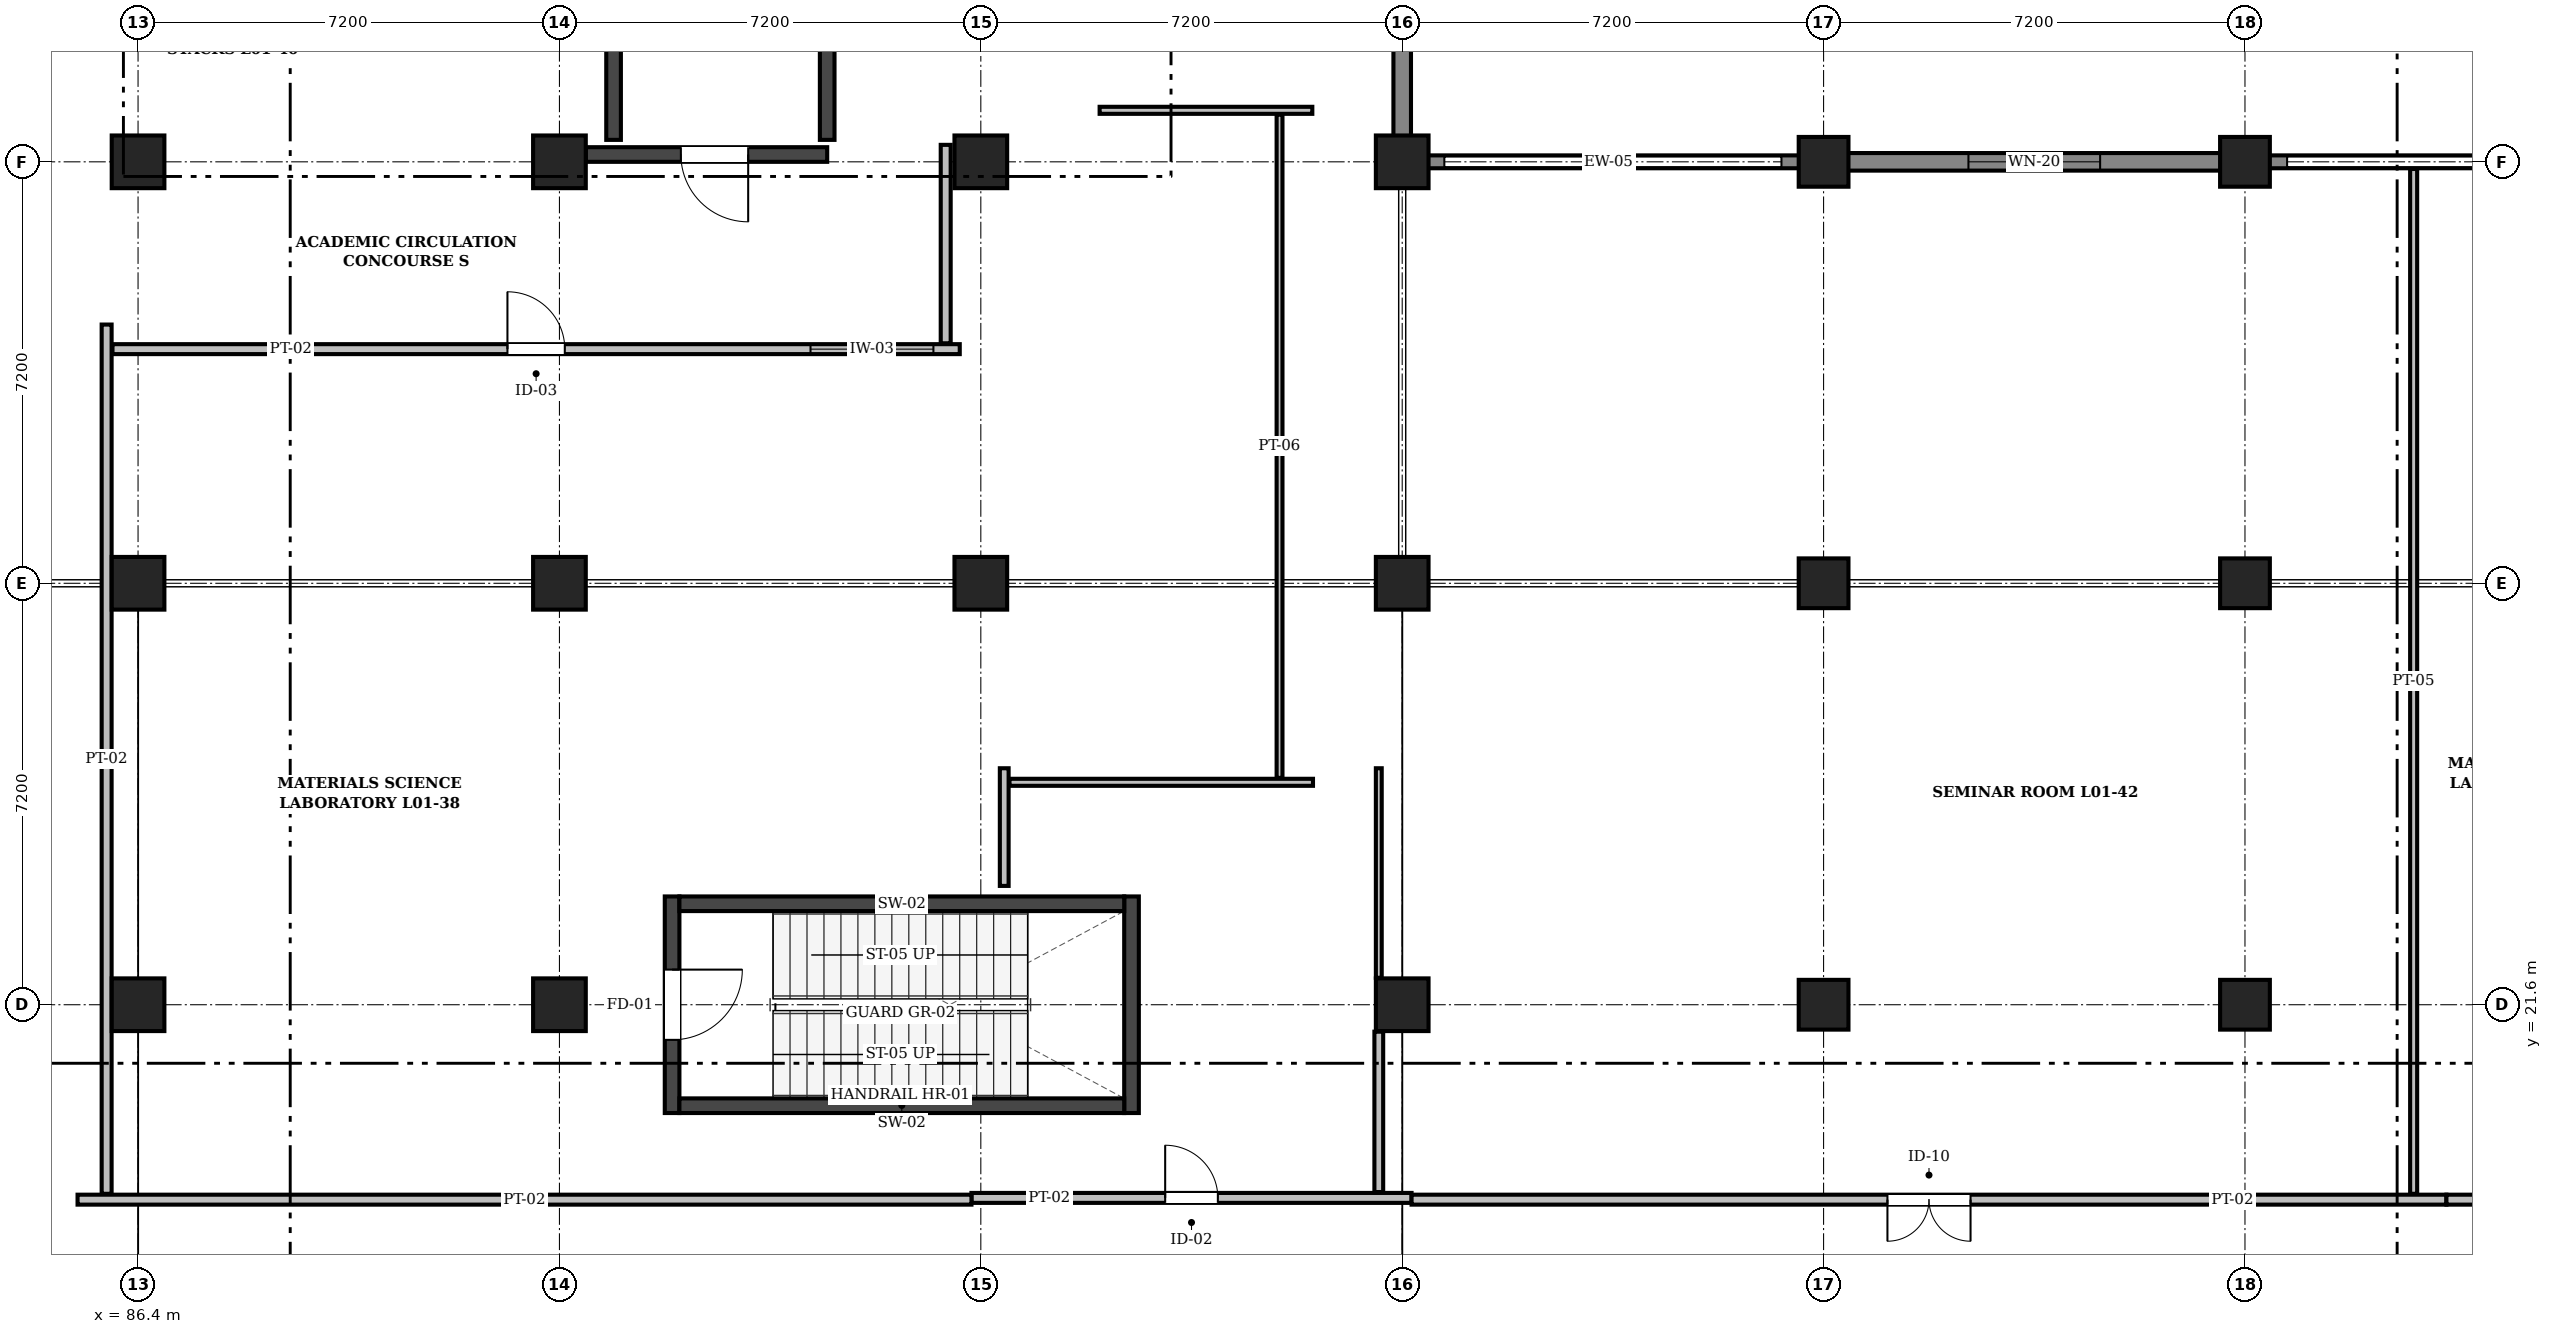
"""IFC4 building model, lengths in metres.
Left out: names, types, materials, properties, quantities, classifications, styles, units other than length and angle.
Written with IfcOpenShell. Run it as: python <this file> out.ifc"""

import sys

from ifc_helpers import new_model, si_unit, direction, frame, frame_2d, origin, origin_2d, place, context, subcontext, project, spatial, rectangle, extrude, element, fill, save


model = new_model("IFC4")
c1 = context("Model", 3, precision=1e-05, world=origin(), true_north=direction((0.0, 1.0)))
c2 = subcontext(c1, "Body", "Model", "MODEL_VIEW")
j1 = project(units=[si_unit("LENGTHUNIT", "METRE"), si_unit("PLANEANGLEUNIT", "RADIAN")], contexts=[c1])
p1 = place(None, origin())
s1 = spatial("IfcSite", under=j1, at=p1, CompositionType="ELEMENT")
p2 = place(p1, origin())
s2 = spatial("IfcBuilding", under=s1, at=p2, CompositionType="ELEMENT")
p3 = place(p2, frame((0.0, 0.0, 4.8)))
s3 = spatial("IfcBuildingStorey", under=s2, at=p3, CompositionType="ELEMENT", Elevation=4.8)
for number, where, z_axis, x_axis in (
    (1, (86.4, 21.6, 0.0), (0.0, 0.0, 1.0), (1.0, 0.0, 0.0)),
    (2, (86.4, 28.8, 0.0), (0.0, 0.0, 1.0), (1.0, 0.0, 0.0)),
    (3, (86.4, 36.0, 0.0), (0.0, 0.0, 1.0), (1.0, 0.0, 0.0)),
    (4, (93.6, 21.6, 0.0), (0.0, 0.0, 1.0), (1.0, 0.0, 0.0)),
    (5, (93.6, 28.8, 0.0), (0.0, 0.0, 1.0), (1.0, 0.0, 0.0)),
    (6, (93.6, 36.0, 0.0), (0.0, 0.0, 1.0), (1.0, 0.0, 0.0)),
    (7, (100.8, 28.8, 0.0), (0.0, 0.0, 1.0), (1.0, 0.0, 0.0)),
    (8, (100.8, 36.0, 0.0), (0.0, 0.0, 1.0), (1.0, 0.0, 0.0)),
    (9, (108.0, 21.6, 0.0), (0.0, 0.0, 1.0), (1.0, 0.0, 0.0)),
    (10, (108.0, 28.8, 0.0), (0.0, 0.0, 1.0), (1.0, 0.0, 0.0)),
    (11, (108.0, 36.0, 0.0), (0.0, 0.0, 1.0), (1.0, 0.0, 0.0)),
):
    element("IfcColumn", number, at=place(p3, frame(where, z_axis=z_axis, x_axis=x_axis)), inside=s3, PredefinedType="COLUMN", context=c2, shape_type="SweptSolid", body=[
        extrude(rectangle(XDim=0.9, YDim=0.9, at=origin_2d()), origin(), (0.0, 0.0, 1.0), 4.8),
    ])
for number, where, z_axis, x_axis in (
    (12, (115.2, 21.6, 0.0), (0.0, 0.0, 1.0), (1.0, 0.0, 0.0)),
    (13, (115.2, 28.8, 0.0), (0.0, 0.0, 1.0), (1.0, 0.0, 0.0)),
    (14, (115.2, 36.0, 0.0), (0.0, 0.0, 1.0), (1.0, 0.0, 0.0)),
    (15, (122.4, 21.6, 0.0), (0.0, 0.0, 1.0), (1.0, 0.0, 0.0)),
    (16, (122.4, 28.8, 0.0), (0.0, 0.0, 1.0), (1.0, 0.0, 0.0)),
    (17, (122.4, 36.0, 0.0), (0.0, 0.0, 1.0), (1.0, 0.0, 0.0)),
):
    element("IfcColumn", number, at=place(p3, frame(where, z_axis=z_axis, x_axis=x_axis)), inside=s3, PredefinedType="COLUMN", context=c2, shape_type="SweptSolid", body=[
        extrude(rectangle(XDim=0.85, YDim=0.85, at=origin_2d()), origin(), (0.0, 0.0, 1.0), 4.8),
    ])
p4 = place(p3, frame((108.0, 43.2, 0.0), z_axis=(0.0, 0.0, 1.0), x_axis=(0.0, -1.0, 0.0)))
e18 = element("IfcWall", 18, at=p4, inside=s3, PredefinedType="SOLIDWALL", context=c2, shape_type="SweptSolid", body=[
    extrude(rectangle(XDim=7.048, YDim=0.3, at=frame_2d((3.524, 0.0))), origin(), (0.0, 0.0, 1.0), 4.52),
])
p5 = place(p4, frame((2.145, 0.0, 0.95)))
e19 = element("IfcOpeningElement", 19, at=p5, cuts=e18, PredefinedType="OPENING", context=c2, shape_type="SweptSolid", body=[
    extrude(rectangle(XDim=2.05, YDim=1.55, at=frame_2d((1.025, 0.775))), frame((0.0, 0.162, 0.0), z_axis=(0.0, -1.0, 0.0), x_axis=(1.0, 0.0, 0.0)), (0.0, 0.0, 1.0), 0.324),
])
p6 = place(p3, frame((107.85, 36.0, 0.0), z_axis=(0.0, 0.0, 1.0), x_axis=(1.0, 0.0, 0.0)))
e20 = element("IfcWall", 20, at=p6, inside=s3, PredefinedType="SOLIDWALL", context=c2, shape_type="SweptSolid", body=[
    extrude(rectangle(XDim=7.35, YDim=0.22, at=frame_2d((3.675, 0.0))), origin(), (0.0, 0.0, 1.0), 1.24),
])
p7 = place(p3, frame((115.2, 36.0, 0.0), z_axis=(0.0, 0.0, 1.0), x_axis=(1.0, 0.0, 0.0)))
e21 = element("IfcWall", 21, at=p7, inside=s3, PredefinedType="SOLIDWALL", context=c2, shape_type="SweptSolid", body=[
    extrude(rectangle(XDim=7.2, YDim=0.3, at=frame_2d((3.6, 0.0))), origin(), (0.0, 0.0, 1.0), 4.52),
])
p8 = place(p7, frame((2.475, 0.0, 0.95)))
e22 = element("IfcOpeningElement", 22, at=p8, cuts=e21, PredefinedType="OPENING", context=c2, shape_type="SweptSolid", body=[
    extrude(rectangle(XDim=2.25, YDim=1.55, at=frame_2d((1.125, 0.775))), frame((0.0, 0.162, 0.0), z_axis=(0.0, -1.0, 0.0), x_axis=(1.0, 0.0, 0.0)), (0.0, 0.0, 1.0), 0.324),
])
p9 = place(p3, frame((122.4, 36.0, 0.0), z_axis=(0.0, 0.0, 1.0), x_axis=(1.0, 0.0, 0.0)))
e23 = element("IfcWall", 23, at=p9, inside=s3, PredefinedType="SOLIDWALL", context=c2, shape_type="SweptSolid", body=[
    extrude(rectangle(XDim=7.2, YDim=0.22, at=frame_2d((3.6, 0.0))), origin(), (0.0, 0.0, 1.0), 1.24),
])
p10 = place(p3, frame((95.525, 19.75, 0.0), z_axis=(0.0, 0.0, 1.0), x_axis=(0.0, 1.0, 0.0)))
e24 = element("IfcWall", 24, at=p10, inside=s3, PredefinedType="SHEAR", context=c2, shape_type="SweptSolid", body=[
    extrude(rectangle(XDim=3.7, YDim=0.25, at=frame_2d((1.85, 0.0))), origin(), (0.0, 0.0, 1.0), 4.55),
])
p11 = place(p10, frame((1.25, 0.0, 0.0)))
e25 = element("IfcOpeningElement", 25, at=p11, cuts=e24, PredefinedType="OPENING", context=c2, shape_type="SweptSolid", body=[
    extrude(rectangle(XDim=1.2, YDim=2.15, at=frame_2d((0.6, 1.075))), frame((0.0, 0.137, 0.0), z_axis=(0.0, -1.0, 0.0), x_axis=(1.0, 0.0, 0.0)), (0.0, 0.0, 1.0), 0.274),
])
p12 = place(p3, frame((103.375, 19.75, 0.0), z_axis=(0.0, 0.0, 1.0), x_axis=(0.0, 1.0, 0.0)))
e26 = element("IfcWall", 26, at=p12, inside=s3, PredefinedType="SHEAR", context=c2, shape_type="SweptSolid", body=[
    extrude(rectangle(XDim=3.7, YDim=0.25, at=frame_2d((1.85, 0.0))), origin(), (0.0, 0.0, 1.0), 4.55),
])
for number, where, z_axis, x_axis in (
    (27, (95.65, 19.875, 0.0), (0.0, 0.0, 1.0), (1.0, 0.0, 0.0)),
    (28, (95.65, 23.325, 0.0), (0.0, 0.0, 1.0), (1.0, 0.0, 0.0)),
):
    element("IfcWall", number, at=place(p3, frame(where, z_axis=z_axis, x_axis=x_axis)), inside=s3, PredefinedType="SHEAR", context=c2, shape_type="SweptSolid", body=[
        extrude(rectangle(XDim=7.6, YDim=0.25, at=frame_2d((3.8, 0.0))), origin(), (0.0, 0.0, 1.0), 4.55),
    ])
p13 = place(p3, frame((94.05, 36.125, 0.0), z_axis=(0.0, 0.0, 1.0), x_axis=(1.0, 0.0, 0.0)))
e29 = element("IfcWall", 29, at=p13, inside=s3, PredefinedType="SHEAR", context=c2, shape_type="SweptSolid", body=[
    extrude(rectangle(XDim=4.125, YDim=0.25, at=frame_2d((2.062, 0.0))), origin(), (0.0, 0.0, 1.0), 4.55),
])
p14 = place(p13, frame((1.625, 0.0, 0.0)))
e30 = element("IfcOpeningElement", 30, at=p14, cuts=e29, PredefinedType="OPENING", context=c2, shape_type="SweptSolid", body=[
    extrude(rectangle(XDim=1.15, YDim=2.15, at=frame_2d((0.575, 1.075))), frame((0.0, 0.137, 0.0), z_axis=(0.0, -1.0, 0.0), x_axis=(1.0, 0.0, 0.0)), (0.0, 0.0, 1.0), 0.274),
])
p15 = place(p3, frame((94.525, 36.375, 0.0), z_axis=(0.0, 0.0, 1.0), x_axis=(0.0, 1.0, 0.0)))
e31 = element("IfcWall", 31, at=p15, inside=s3, PredefinedType="SHEAR", context=c2, shape_type="SweptSolid", body=[
    extrude(rectangle(XDim=2.77, YDim=0.25, at=frame_2d((1.385, 0.0))), origin(), (0.0, 0.0, 1.0), 4.55),
])
p16 = place(p3, frame((98.175, 36.375, 0.0), z_axis=(0.0, 0.0, 1.0), x_axis=(0.0, 1.0, 0.0)))
e32 = element("IfcWall", 32, at=p16, inside=s3, PredefinedType="SHEAR", context=c2, shape_type="SweptSolid", body=[
    extrude(rectangle(XDim=3.225, YDim=0.25, at=frame_2d((1.613, 0.0))), origin(), (0.0, 0.0, 1.0), 4.55),
])
p17 = place(p3, frame((100.64, 18.3, 0.0), z_axis=(0.0, 0.0, 1.0), x_axis=(1.0, 0.0, 0.0)))
e33 = element("IfcWall", 33, at=p17, inside=s3, PredefinedType="PARTITIONING", context=c2, shape_type="SweptSolid", body=[
    extrude(rectangle(XDim=7.52, YDim=0.17, at=frame_2d((3.76, 0.0))), origin(), (0.0, 0.0, 1.0), 4.46),
])
p18 = place(p17, frame((3.31, 0.0, 0.0)))
e34 = element("IfcOpeningElement", 34, at=p18, cuts=e33, PredefinedType="OPENING", context=c2, shape_type="SweptSolid", body=[
    extrude(rectangle(XDim=0.9, YDim=2.08, at=frame_2d((0.45, 1.04))), frame((0.0, 0.097, 0.0), z_axis=(0.0, -1.0, 0.0), x_axis=(1.0, 0.0, 0.0)), (0.0, 0.0, 1.0), 0.194),
])
p19 = place(p3, frame((101.2, 23.63, 0.0), z_axis=(0.0, 0.0, 1.0), x_axis=(0.0, 1.0, 0.0)))
e35 = element("IfcWall", 35, at=p19, inside=s3, PredefinedType="PARTITIONING", context=c2, shape_type="SweptSolid", body=[
    extrude(rectangle(XDim=2.01, YDim=0.15, at=frame_2d((1.005, 0.0))), origin(), (0.0, 0.0, 1.0), 4.46),
])
p20 = place(p3, frame((101.29, 25.4, 0.0), z_axis=(0.0, 0.0, 1.0), x_axis=(1.0, 0.0, 0.0)))
e36 = element("IfcWall", 36, at=p20, inside=s3, PredefinedType="PARTITIONING", context=c2, shape_type="SweptSolid", body=[
    extrude(rectangle(XDim=5.186, YDim=0.12, at=frame_2d((2.593, 0.0))), origin(), (0.0, 0.0, 1.0), 4.46),
])
p21 = place(p3, frame((107.6, 22.06, 0.0), z_axis=(0.0, 0.0, 1.0), x_axis=(0.0, 1.0, 0.0)))
e37 = element("IfcWall", 37, at=p21, inside=s3, PredefinedType="PARTITIONING", context=c2, shape_type="SweptSolid", body=[
    extrude(rectangle(XDim=3.58, YDim=0.1, at=frame_2d((1.79, 0.0))), origin(), (0.0, 0.0, 1.0), 4.46),
])
p22 = place(p3, frame((107.6, 18.4, 0.0), z_axis=(0.0, 0.0, 1.0), x_axis=(0.0, 1.0, 0.0)))
e38 = element("IfcWall", 38, at=p22, inside=s3, PredefinedType="PARTITIONING", context=c2, shape_type="SweptSolid", body=[
    extrude(rectangle(XDim=2.74, YDim=0.15, at=frame_2d((1.37, 0.0))), origin(), (0.0, 0.0, 1.0), 4.46),
])
p23 = place(p3, frame((85.366, 18.27, 0.0), z_axis=(0.0, 0.0, 1.0), x_axis=(1.0, 0.0, 0.0)))
e39 = element("IfcWall", 39, at=p23, inside=s3, PredefinedType="PARTITIONING", context=c2, shape_type="SweptSolid", body=[
    extrude(rectangle(XDim=15.273, YDim=0.17, at=frame_2d((7.637, 0.0))), origin(), (0.0, 0.0, 1.0), 4.46),
])
p24 = place(p3, frame((108.16, 18.27, 0.0), z_axis=(0.0, 0.0, 1.0), x_axis=(1.0, 0.0, 0.0)))
e40 = element("IfcWall", 40, at=p24, inside=s3, PredefinedType="PARTITIONING", context=c2, shape_type="SweptSolid", body=[
    extrude(rectangle(XDim=17.682, YDim=0.17, at=frame_2d((8.841, 0.0))), origin(), (0.0, 0.0, 1.0), 4.46),
])
p25 = place(p24, frame((8.131, 0.0, 0.0)))
e41 = element("IfcOpeningElement", 41, at=p25, cuts=e40, PredefinedType="OPENING", context=c2, shape_type="SweptSolid", body=[
    extrude(rectangle(XDim=1.42, YDim=2.24, at=frame_2d((0.71, 1.12))), frame((0.0, 0.097, 0.0), z_axis=(0.0, -1.0, 0.0), x_axis=(1.0, 0.0, 0.0)), (0.0, 0.0, 1.0), 0.194),
])
p26 = place(p3, frame((125.842, 18.27, 0.0), z_axis=(0.0, 0.0, 1.0), x_axis=(1.0, 0.0, 0.0)))
e42 = element("IfcWall", 42, at=p26, inside=s3, PredefinedType="PARTITIONING", context=c2, shape_type="SweptSolid", body=[
    extrude(rectangle(XDim=2.858, YDim=0.17, at=frame_2d((1.429, 0.0))), origin(), (0.0, 0.0, 1.0), 4.46),
])
p27 = place(p26, frame((0.819, 0.0, 0.0)))
e43 = element("IfcOpeningElement", 43, at=p27, cuts=e42, PredefinedType="OPENING", context=c2, shape_type="SweptSolid", body=[
    extrude(rectangle(XDim=1.22, YDim=2.22, at=frame_2d((0.61, 1.11))), frame((0.0, 0.097, 0.0), z_axis=(0.0, -1.0, 0.0), x_axis=(1.0, 0.0, 0.0)), (0.0, 0.0, 1.0), 0.194),
])
p28 = place(p3, frame((85.863, 18.37, 0.0), z_axis=(0.0, 0.0, 1.0), x_axis=(0.0, 1.0, 0.0)))
e44 = element("IfcWall", 44, at=p28, inside=s3, PredefinedType="PARTITIONING", context=c2, shape_type="SweptSolid", body=[
    extrude(rectangle(XDim=14.85, YDim=0.17, at=frame_2d((7.425, 0.0))), origin(), (0.0, 0.0, 1.0), 4.46),
])
p29 = place(p3, frame((85.963, 32.8, 0.0), z_axis=(0.0, 0.0, 1.0), x_axis=(1.0, 0.0, 0.0)))
e45 = element("IfcWall", 45, at=p29, inside=s3, PredefinedType="PARTITIONING", context=c2, shape_type="SweptSolid", body=[
    extrude(rectangle(XDim=14.477, YDim=0.17, at=frame_2d((7.238, 0.0))), origin(), (0.0, 0.0, 1.0), 4.46),
])
p30 = place(p29, frame((6.748, 0.0, 0.0)))
e46 = element("IfcOpeningElement", 46, at=p30, cuts=e45, PredefinedType="OPENING", context=c2, shape_type="SweptSolid", body=[
    extrude(rectangle(XDim=0.98, YDim=2.14, at=frame_2d((0.49, 1.07))), frame((0.0, 0.097, 0.0), z_axis=(0.0, -1.0, 0.0), x_axis=(1.0, 0.0, 0.0)), (0.0, 0.0, 1.0), 0.194),
])
p31 = place(p29, frame((11.927, 0.0, 1.05)))
e47 = element("IfcOpeningElement", 47, at=p31, cuts=e45, PredefinedType="OPENING", context=c2, shape_type="SweptSolid", body=[
    extrude(rectangle(XDim=2.1, YDim=1.05, at=frame_2d((1.05, 0.525))), frame((0.0, 0.097, 0.0), z_axis=(0.0, -1.0, 0.0), x_axis=(1.0, 0.0, 0.0)), (0.0, 0.0, 1.0), 0.194),
])
p32 = place(p3, frame((100.2, 32.9, 0.0), z_axis=(0.0, 0.0, 1.0), x_axis=(0.0, 1.0, 0.0)))
e48 = element("IfcWall", 48, at=p32, inside=s3, PredefinedType="PARTITIONING", context=c2, shape_type="SweptSolid", body=[
    extrude(rectangle(XDim=3.39, YDim=0.17, at=frame_2d((1.695, 0.0))), origin(), (0.0, 0.0, 1.0), 4.46),
])
p33 = place(p3, frame((102.83, 36.88, 0.0), z_axis=(0.0, 0.0, 1.0), x_axis=(1.0, 0.0, 0.0)))
e49 = element("IfcWall", 49, at=p33, inside=s3, PredefinedType="PARTITIONING", context=c2, shape_type="SweptSolid", body=[
    extrude(rectangle(XDim=3.634, YDim=0.12, at=frame_2d((1.817, 0.0))), origin(), (0.0, 0.0, 1.0), 4.46),
])
p34 = place(p3, frame((105.904, 25.475, 0.0), z_axis=(0.0, 0.0, 1.0), x_axis=(0.0, 1.0, 0.0)))
e50 = element("IfcWall", 50, at=p34, inside=s3, PredefinedType="PARTITIONING", context=c2, shape_type="SweptSolid", body=[
    extrude(rectangle(XDim=11.33, YDim=0.1, at=frame_2d((5.665, 0.0))), origin(), (0.0, 0.0, 1.0), 4.46),
])
p35 = place(p3, frame((125.282, 18.37, 0.0), z_axis=(0.0, 0.0, 1.0), x_axis=(0.0, 1.0, 0.0)))
e51 = element("IfcWall", 51, at=p35, inside=s3, PredefinedType="PARTITIONING", context=c2, shape_type="SweptSolid", body=[
    extrude(rectangle(XDim=17.508, YDim=0.12, at=frame_2d((8.754, 0.0))), origin(), (0.0, 0.0, 1.0), 4.46),
])
p36 = place(p8, origin())
e52 = element("IfcWindow", 52, at=p36, inside=s3, PartitioningType="SINGLE_PANEL", PredefinedType="WINDOW", context=c2, shape_type="SweptSolid", body=[
    extrude(rectangle(XDim=2.25, YDim=1.55, at=frame_2d((1.125, 0.775))), frame((0.0, 0.03, 0.0), z_axis=(0.0, -1.0, 0.0), x_axis=(1.0, 0.0, 0.0)), (0.0, 0.0, 1.0), 0.06),
])
fill(e22, e52)
p37 = place(p11, frame((1.2, 0.0, 0.0), z_axis=(0.0, 0.0, 1.0), x_axis=(-1.0, 0.0, 0.0)))
e53 = element("IfcDoor", 53, at=p37, inside=s3, OperationType="SINGLE_SWING_LEFT", PredefinedType="DOOR", context=c2, shape_type="SweptSolid", body=[
    extrude(rectangle(XDim=1.2, YDim=2.15, at=frame_2d((0.6, 1.075))), frame((0.0, 0.025, 0.0), z_axis=(0.0, -1.0, 0.0), x_axis=(1.0, 0.0, 0.0)), (0.0, 0.0, 1.0), 0.05),
])
fill(e25, e53)
p38 = place(p14, frame((1.15, 0.0, 0.0), z_axis=(0.0, 0.0, 1.0), x_axis=(-1.0, 0.0, 0.0)))
e54 = element("IfcDoor", 54, at=p38, inside=s3, OperationType="SINGLE_SWING_LEFT", PredefinedType="DOOR", context=c2, shape_type="SweptSolid", body=[
    extrude(rectangle(XDim=1.15, YDim=2.15, at=frame_2d((0.575, 1.075))), frame((0.0, 0.025, 0.0), z_axis=(0.0, -1.0, 0.0), x_axis=(1.0, 0.0, 0.0)), (0.0, 0.0, 1.0), 0.05),
])
fill(e30, e54)
p39 = place(p25, frame((1.42, 0.0, 0.0), z_axis=(0.0, 0.0, 1.0), x_axis=(-1.0, 0.0, 0.0)))
e55 = element("IfcDoor", 55, at=p39, inside=s3, OperationType="DOUBLE_DOOR_SINGLE_SWING", PredefinedType="DOOR", context=c2, shape_type="SweptSolid", body=[
    extrude(rectangle(XDim=1.42, YDim=2.24, at=frame_2d((0.71, 1.12))), frame((0.0, 0.025, 0.0), z_axis=(0.0, -1.0, 0.0), x_axis=(1.0, 0.0, 0.0)), (0.0, 0.0, 1.0), 0.05),
])
fill(e41, e55)
p40 = place(p30, origin())
e56 = element("IfcDoor", 56, at=p40, inside=s3, OperationType="SINGLE_SWING_LEFT", PredefinedType="DOOR", context=c2, shape_type="SweptSolid", body=[
    extrude(rectangle(XDim=0.98, YDim=2.14, at=frame_2d((0.49, 1.07))), frame((0.0, 0.025, 0.0), z_axis=(0.0, -1.0, 0.0), x_axis=(1.0, 0.0, 0.0)), (0.0, 0.0, 1.0), 0.05),
])
fill(e46, e56)
p41 = place(p31, origin())
e57 = element("IfcWindow", 57, at=p41, inside=s3, PartitioningType="SINGLE_PANEL", PredefinedType="WINDOW", context=c2, shape_type="SweptSolid", body=[
    extrude(rectangle(XDim=2.1, YDim=1.05, at=frame_2d((1.05, 0.525))), frame((0.0, 0.03, 0.0), z_axis=(0.0, -1.0, 0.0), x_axis=(1.0, 0.0, 0.0)), (0.0, 0.0, 1.0), 0.06),
])
fill(e47, e57)
p42 = place(p18, origin())
e58 = element("IfcDoor", 58, at=p42, inside=s3, OperationType="SINGLE_SWING_LEFT", PredefinedType="DOOR", context=c2, shape_type="SweptSolid", body=[
    extrude(rectangle(XDim=0.9, YDim=2.08, at=frame_2d((0.45, 1.04))), frame((0.0, 0.025, 0.0), z_axis=(0.0, -1.0, 0.0), x_axis=(1.0, 0.0, 0.0)), (0.0, 0.0, 1.0), 0.05),
])
fill(e34, e58)
save(model, sys.argv[1])
